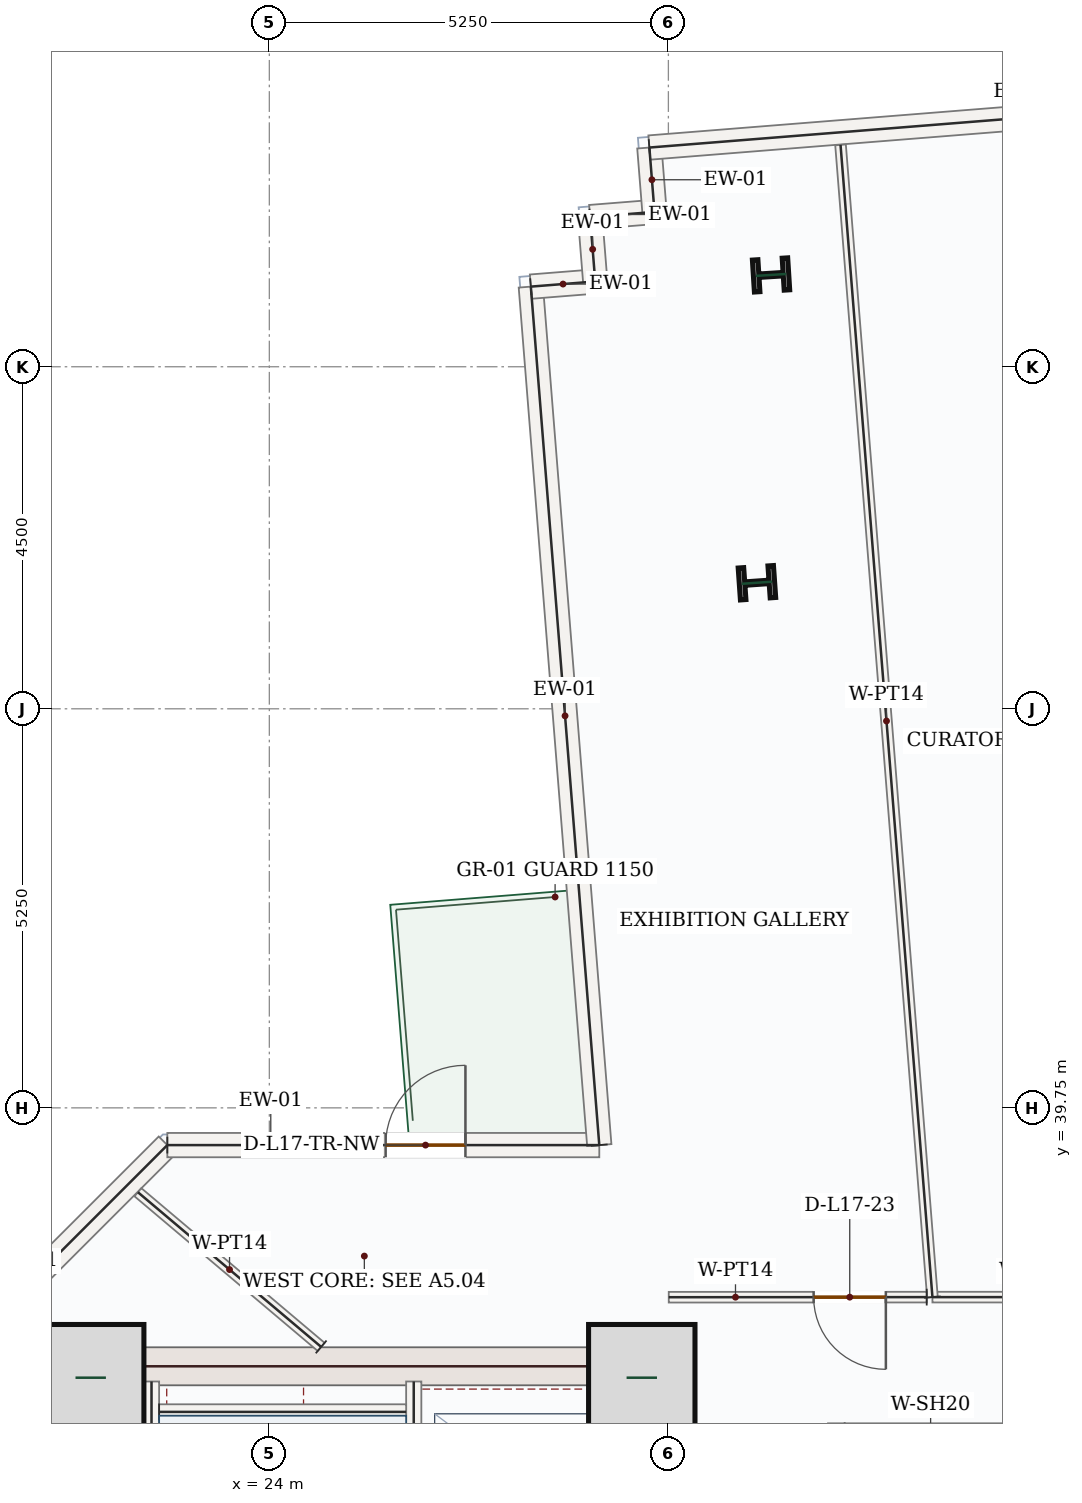
"""IFC4 building model, lengths in metres.
Left out: names, types, materials, properties, quantities, classifications, styles, units other than length and angle.
Written with IfcOpenShell. Run it as: python <this file> out.ifc"""

import sys

from ifc_helpers import new_model, si_unit, direction, frame, frame_2d, origin, origin_2d, place, context, subcontext, project, spatial, rectangle, i_section, extrude, source, transform, mapped, element, fill, save


model = new_model("IFC4")
c1 = context("Model", 3, precision=1e-05, world=origin(), true_north=direction((0.0, 1.0)))
c2 = subcontext(c1, "Body", "Model", "MODEL_VIEW")
j1 = project(units=[si_unit("LENGTHUNIT", "METRE"), si_unit("PLANEANGLEUNIT", "RADIAN")], contexts=[c1])
p1 = place(None, origin())
s1 = spatial("IfcSite", under=j1, at=p1, CompositionType="ELEMENT")
p2 = place(p1, origin())
s2 = spatial("IfcBuilding", under=s1, at=p2, CompositionType="ELEMENT")
p3 = place(p2, frame((0.0, 0.0, 79.5)))
s3 = spatial("IfcBuildingStorey", under=s2, at=p3, CompositionType="ELEMENT", Elevation=79.5)
m1 = source(origin(), c2, "Body", "SweptSolid", [
    extrude(rectangle(XDim=8.55, YDim=0.5, at=frame_2d((4.275, 0.0))), origin(), (0.0, 0.0, 1.0), 3.95),
])
p4 = place(p3, frame((21.5, 28.05, 0.0), z_axis=(0.0, 0.0, 1.0), x_axis=(0.0, 1.0, 0.0)))
e1 = element("IfcWall", 1, at=p4, inside=s3, PredefinedType="SHEAR", context=c2, shape_type="MappedRepresentation", body=[
    mapped(m1, transform((0.0, 0.0, 0.0), x_axis=(1.0, 0.0, 0.0), y_axis=(0.0, 1.0, 0.0), z_axis=(0.0, 0.0, 1.0), scale=1.0)),
])
p5 = place(p3, frame((29.0, 28.05, 0.0), z_axis=(0.0, 0.0, 1.0), x_axis=(0.0, 1.0, 0.0)))
e2 = element("IfcWall", 2, at=p5, inside=s3, PredefinedType="SHEAR", context=c2, shape_type="SweptSolid", body=[
    extrude(rectangle(XDim=8.55, YDim=0.5, at=frame_2d((4.275, 0.0))), origin(), (0.0, 0.0, 1.0), 3.95),
])
p6 = place(p5, frame((1.5, 0.0, 0.0)))
e3 = element("IfcOpeningElement", 3, at=p6, cuts=e2, PredefinedType="OPENING", context=c2, shape_type="SweptSolid", body=[
    extrude(rectangle(XDim=1.1, YDim=2.2, at=frame_2d((0.55, 1.1))), frame((0.0, 0.26, 0.0), z_axis=(0.0, -1.0, 0.0), x_axis=(1.0, 0.0, 0.0)), (0.0, 0.0, 1.0), 0.52),
])
m2 = source(origin(), c2, "Body", "SweptSolid", [
    extrude(rectangle(XDim=7.0, YDim=0.5, at=frame_2d((3.5, 0.0))), origin(), (0.0, 0.0, 1.0), 3.95),
])
p7 = place(p3, frame((21.75, 36.35, 0.0), z_axis=(0.0, 0.0, 1.0), x_axis=(1.0, 0.0, 0.0)))
e4 = element("IfcWall", 4, at=p7, inside=s3, PredefinedType="SHEAR", context=c2, shape_type="MappedRepresentation", body=[
    mapped(m2, transform((0.0, 0.0, 0.0), x_axis=(1.0, 0.0, 0.0), y_axis=(0.0, 1.0, 0.0), z_axis=(0.0, 0.0, 1.0), scale=1.0)),
])
m3 = source(origin(), c2, "Body", "SweptSolid", [
    extrude(rectangle(XDim=1.4, YDim=1.4, at=origin_2d()), origin(), (0.0, 0.0, 1.0), 4.2),
])
for number, where, z_axis, x_axis in (
    (5, (21.65, 36.2, 0.0), (0.0, 0.0, 1.0), (1.0, 0.0, 0.0)),
    (6, (28.9, 36.2, 0.0), (0.0, 0.0, 1.0), (1.0, 0.0, 0.0)),
):
    element("IfcColumn", number, at=place(p3, frame(where, z_axis=z_axis, x_axis=x_axis)), inside=s3, PredefinedType="COLUMN", context=c2, shape_type="MappedRepresentation", body=[
        mapped(m3, transform((0.0, 0.0, 0.0), x_axis=(1.0, 0.0, 0.0), y_axis=(0.0, 1.0, 0.0), z_axis=(0.0, 0.0, 1.0), scale=1.0)),
    ])
m4 = source(origin(), c2, "Body", "SweptSolid", [
    extrude(i_section(OverallWidth=0.421, OverallDepth=0.465, WebThickness=0.045, FlangeThickness=0.073, FilletRadius=0.018, at=origin_2d()), origin(), (0.0, 0.0, 1.0), 4.2),
])
for number, where, z_axis, x_axis in (
    (7, (30.415, 46.658, 0.0), (0.0, 0.0, 1.0), (-0.07, 0.998, 0.0)),
    (8, (30.601, 50.708, 0.0), (0.0, 0.0, 1.0), (-0.063, 0.998, 0.0)),
):
    element("IfcColumn", number, at=place(p3, frame(where, z_axis=z_axis, x_axis=x_axis)), inside=s3, PredefinedType="COLUMN", context=c2, shape_type="MappedRepresentation", body=[
        mapped(m4, transform((0.0, 0.0, 0.0), x_axis=(1.0, 0.0, 0.0), y_axis=(0.0, 1.0, 0.0), z_axis=(0.0, 0.0, 1.0), scale=1.0)),
    ])
m5 = source(origin(), c2, "Body", "SweptSolid", [
    extrude(rectangle(XDim=5.258, YDim=0.32, at=frame_2d((2.629, 0.0))), origin(), (0.0, 0.0, 1.0), 3.95),
])
p8 = place(p3, frame((18.94, 35.542, 0.0), z_axis=(0.0, 0.0, 1.0), x_axis=(0.707106781187, 0.707106781187, 0.0)))
e9 = element("IfcWall", 9, at=p8, inside=s3, PredefinedType="SOLIDWALL", context=c2, shape_type="MappedRepresentation", body=[
    mapped(m5, transform((0.0, 0.0, 0.0), x_axis=(1.0, 0.0, 0.0), y_axis=(0.0, 1.0, 0.0), z_axis=(0.0, 0.0, 1.0), scale=1.0)),
])
p9 = place(p3, frame((22.658, 39.26, 0.0), z_axis=(0.0, 0.0, 1.0), x_axis=(1.0, 0.0, 0.0)))
e10 = element("IfcWall", 10, at=p9, inside=s3, PredefinedType="SOLIDWALL", context=c2, shape_type="SweptSolid", body=[
    extrude(rectangle(XDim=5.683, YDim=0.32, at=frame_2d((2.842, 0.0))), origin(), (0.0, 0.0, 1.0), 3.95),
])
p10 = place(p9, frame((2.872, 0.0, 0.0)))
e11 = element("IfcOpeningElement", 11, at=p10, cuts=e10, PredefinedType="OPENING", context=c2, shape_type="SweptSolid", body=[
    extrude(rectangle(XDim=1.05, YDim=2.15, at=frame_2d((0.525, 1.075))), frame((0.0, 0.17, 0.0), z_axis=(0.0, -1.0, 0.0), x_axis=(1.0, 0.0, 0.0)), (0.0, 0.0, 1.0), 0.34),
])
m6 = source(origin(), c2, "Body", "SweptSolid", [
    extrude(rectangle(XDim=11.33, YDim=0.32, at=frame_2d((5.665, 0.0))), origin(), (0.0, 0.0, 1.0), 3.95),
])
p11 = place(p3, frame((28.341, 39.26, 0.0), z_axis=(0.0, 0.0, 1.0), x_axis=(-0.079512268319, 0.996833887459, 0.0)))
e12 = element("IfcWall", 12, at=p11, inside=s3, PredefinedType="SOLIDWALL", context=c2, shape_type="MappedRepresentation", body=[
    mapped(m6, transform((0.0, 0.0, 0.0), x_axis=(1.0, 0.0, 0.0), y_axis=(0.0, 1.0, 0.0), z_axis=(0.0, 0.0, 1.0), scale=1.0)),
])
m7 = source(origin(), c2, "Body", "SweptSolid", [
    extrude(rectangle(XDim=0.85, YDim=0.32, at=frame_2d((0.425, 0.0))), origin(), (0.0, 0.0, 1.0), 3.95),
])
for number, where, z_axis, x_axis in (
    (13, (27.44, 50.554, 0.0), (0.0, 0.0, 1.0), (0.997, 0.079, 0.0)),
    (14, (28.288, 50.622, 0.0), (0.0, 0.0, 1.0), (-0.08, 0.997, 0.0)),
    (15, (28.22, 51.469, 0.0), (0.0, 0.0, 1.0), (0.997, 0.08, 0.0)),
):
    element("IfcWall", number, at=place(p3, frame(where, z_axis=z_axis, x_axis=x_axis)), inside=s3, PredefinedType="SOLIDWALL", context=c2, shape_type="MappedRepresentation", body=[
        mapped(m7, transform((0.0, 0.0, 0.0), x_axis=(1.0, 0.0, 0.0), y_axis=(0.0, 1.0, 0.0), z_axis=(0.0, 0.0, 1.0), scale=1.0)),
    ])
m8 = source(origin(), c2, "Body", "SweptSolid", [
    extrude(rectangle(XDim=0.85, YDim=0.32, at=frame_2d((0.425, 0.0))), origin(), (0.0, 0.0, 1.0), 3.95),
])
p12 = place(p3, frame((29.067, 51.537, 0.0), z_axis=(0.0, 0.0, 1.0), x_axis=(-0.079573954853, 0.996828965123, 0.0)))
e16 = element("IfcWall", 16, at=p12, inside=s3, PredefinedType="SOLIDWALL", context=c2, shape_type="MappedRepresentation", body=[
    mapped(m8, transform((0.0, 0.0, 0.0), x_axis=(1.0, 0.0, 0.0), y_axis=(0.0, 1.0, 0.0), z_axis=(0.0, 0.0, 1.0), scale=1.0)),
])
m9 = source(origin(), c2, "Body", "SweptSolid", [
    extrude(rectangle(XDim=9.92, YDim=0.32, at=frame_2d((4.96, 0.0))), origin(), (0.0, 0.0, 1.0), 3.95),
])
p13 = place(p3, frame((29.0, 52.384, 0.0), z_axis=(0.0, 0.0, 1.0), x_axis=(0.996833485558, 0.079517306731, 0.0)))
e17 = element("IfcWall", 17, at=p13, inside=s3, PredefinedType="SOLIDWALL", context=c2, shape_type="MappedRepresentation", body=[
    mapped(m9, transform((0.0, 0.0, 0.0), x_axis=(1.0, 0.0, 0.0), y_axis=(0.0, 1.0, 0.0), z_axis=(0.0, 0.0, 1.0), scale=1.0)),
])
m10 = source(origin(), c2, "Body", "SweptSolid", [
    extrude(rectangle(XDim=7.87, YDim=0.2, at=frame_2d((3.935, 0.0))), origin(), (0.0, 0.0, 1.0), 3.95),
])
p14 = place(p3, frame((22.45, 28.28, 0.0), z_axis=(0.0, 0.0, 1.0), x_axis=(0.0, 1.0, 0.0)))
e18 = element("IfcWall", 18, at=p14, inside=s3, PredefinedType="SOLIDWALL", context=c2, shape_type="MappedRepresentation", body=[
    mapped(m10, transform((0.0, 0.0, 0.0), x_axis=(1.0, 0.0, 0.0), y_axis=(0.0, 1.0, 0.0), z_axis=(0.0, 0.0, 1.0), scale=1.0)),
])
p15 = place(p3, frame((25.9, 28.15, 0.0), z_axis=(0.0, 0.0, 1.0), x_axis=(0.0, 1.0, 0.0)))
e19 = element("IfcWall", 19, at=p15, inside=s3, PredefinedType="SOLIDWALL", context=c2, shape_type="SweptSolid", body=[
    extrude(rectangle(XDim=8.0, YDim=0.2, at=frame_2d((4.0, 0.0))), origin(), (0.0, 0.0, 1.0), 3.95),
])
p16 = place(p15, frame((0.4, 0.0, 0.0)))
e20 = element("IfcOpeningElement", 20, at=p16, cuts=e19, PredefinedType="OPENING", context=c2, shape_type="SweptSolid", body=[
    extrude(rectangle(XDim=1.05, YDim=2.15, at=frame_2d((0.525, 1.075))), frame((0.0, 0.11, 0.0), z_axis=(0.0, -1.0, 0.0), x_axis=(1.0, 0.0, 0.0)), (0.0, 0.0, 1.0), 0.22),
])
m11 = source(origin(), c2, "Body", "SweptSolid", [
    extrude(rectangle(XDim=3.25, YDim=0.2, at=frame_2d((1.625, 0.0))), origin(), (0.0, 0.0, 1.0), 3.95),
])
p17 = place(p3, frame((22.55, 35.75, 0.0), z_axis=(0.0, 0.0, 1.0), x_axis=(1.0, 0.0, 0.0)))
e21 = element("IfcWall", 21, at=p17, inside=s3, PredefinedType="SOLIDWALL", context=c2, shape_type="MappedRepresentation", body=[
    mapped(m11, transform((0.0, 0.0, 0.0), x_axis=(1.0, 0.0, 0.0), y_axis=(0.0, 1.0, 0.0), z_axis=(0.0, 0.0, 1.0), scale=1.0)),
])
m12 = source(origin(), c2, "Body", "SweptSolid", [
    extrude(rectangle(XDim=2.4, YDim=0.2, at=frame_2d((1.2, 0.0))), origin(), (0.0, 0.0, 1.0), 3.95),
])
p18 = place(p3, frame((31.45, 33.2, 0.0), z_axis=(0.0, 0.0, 1.0), x_axis=(0.0, 1.0, 0.0)))
e22 = element("IfcWall", 22, at=p18, inside=s3, PredefinedType="SOLIDWALL", context=c2, shape_type="MappedRepresentation", body=[
    mapped(m12, transform((0.0, 0.0, 0.0), x_axis=(1.0, 0.0, 0.0), y_axis=(0.0, 1.0, 0.0), z_axis=(0.0, 0.0, 1.0), scale=1.0)),
])
p19 = place(p3, frame((37.384, 37.26, 0.0), z_axis=(0.0, 0.0, 1.0), x_axis=(-1.0, 0.0, 0.0)))
e23 = element("IfcWall", 23, at=p19, inside=s3, PredefinedType="PARTITIONING", context=c2, shape_type="SweptSolid", body=[
    extrude(rectangle(XDim=4.66, YDim=0.14, at=frame_2d((2.33, 0.0))), origin(), (0.0, 0.0, 1.0), 3.95),
])
p20 = place(p19, frame((0.816, 0.0, 0.0)))
e24 = element("IfcOpeningElement", 24, at=p20, cuts=e23, PredefinedType="OPENING", context=c2, shape_type="SweptSolid", body=[
    extrude(rectangle(XDim=0.95, YDim=2.15, at=frame_2d((0.475, 1.075))), frame((0.0, 0.08, 0.0), z_axis=(0.0, -1.0, 0.0), x_axis=(1.0, 0.0, 0.0)), (0.0, 0.0, 1.0), 0.16),
])
m13 = source(origin(), c2, "Body", "SweptSolid", [
    extrude(rectangle(XDim=15.207, YDim=0.14, at=frame_2d((7.604, 0.0))), origin(), (0.0, 0.0, 1.0), 3.95),
])
p21 = place(p3, frame((32.724, 37.26, 0.0), z_axis=(0.0, 0.0, 1.0), x_axis=(-0.07950146843, 0.996834748851, 0.0)))
e25 = element("IfcWall", 25, at=p21, inside=s3, PredefinedType="PARTITIONING", context=c2, shape_type="MappedRepresentation", body=[
    mapped(m13, transform((0.0, 0.0, 0.0), x_axis=(1.0, 0.0, 0.0), y_axis=(0.0, 1.0, 0.0), z_axis=(0.0, 0.0, 1.0), scale=1.0)),
])
p22 = place(p3, frame((32.649, 37.26, 0.0), z_axis=(0.0, 0.0, 1.0), x_axis=(-0.999999935313, -0.00035968633, 0.0)))
e26 = element("IfcWall", 26, at=p22, inside=s3, PredefinedType="PARTITIONING", context=c2, shape_type="SweptSolid", body=[
    extrude(rectangle(XDim=3.394, YDim=0.14, at=frame_2d((1.697, 0.0))), origin(), (0.0, 0.0, 1.0), 3.95),
])
p23 = place(p22, frame((0.538, 0.0, 0.0)))
e27 = element("IfcOpeningElement", 27, at=p23, cuts=e26, PredefinedType="OPENING", context=c2, shape_type="SweptSolid", body=[
    extrude(rectangle(XDim=0.95, YDim=2.15, at=frame_2d((0.475, 1.075))), frame((0.0, 0.08, 0.0), z_axis=(0.0, -1.0, 0.0), x_axis=(1.0, 0.0, 0.0)), (0.0, 0.0, 1.0), 0.16),
])
m14 = source(origin(), c2, "Body", "SweptSolid", [
    extrude(rectangle(XDim=3.155, YDim=0.14, at=frame_2d((1.577, 0.0))), origin(), (0.0, 0.0, 1.0), 3.95),
])
p24 = place(p3, frame((24.682, 36.605, 0.0), z_axis=(0.0, 0.0, 1.0), x_axis=(-0.76411384058, 0.645081420159, 0.0)))
e28 = element("IfcWall", 28, at=p24, inside=s3, PredefinedType="PARTITIONING", context=c2, shape_type="MappedRepresentation", body=[
    mapped(m14, transform((0.0, 0.0, 0.0), x_axis=(1.0, 0.0, 0.0), y_axis=(0.0, 1.0, 0.0), z_axis=(0.0, 0.0, 1.0), scale=1.0)),
])
m15 = source(origin(), c2, "Body", "SweptSolid", [
    extrude(rectangle(XDim=1.05, YDim=2.15, at=frame_2d((0.525, 1.075))), frame((0.0, 0.025, 0.0), z_axis=(0.0, -1.0, 0.0), x_axis=(1.0, 0.0, 0.0)), (0.0, 0.0, 1.0), 0.05),
])
p25 = place(p10, origin())
e29 = element("IfcDoor", 29, at=p25, inside=s3, OperationType="SINGLE_SWING_RIGHT", PredefinedType="DOOR", context=c2, shape_type="MappedRepresentation", body=[
    mapped(m15, transform((0.0, 0.0, 0.0), x_axis=(1.0, 0.0, 0.0), y_axis=(0.0, 1.0, 0.0), z_axis=(0.0, 0.0, 1.0), scale=1.0)),
])
fill(e11, e29)
m16 = source(origin(), c2, "Body", "SweptSolid", [
    extrude(rectangle(XDim=0.95, YDim=2.15, at=frame_2d((0.475, 1.075))), frame((0.0, 0.025, 0.0), z_axis=(0.0, -1.0, 0.0), x_axis=(1.0, 0.0, 0.0)), (0.0, 0.0, 1.0), 0.05),
])
p26 = place(p23, origin())
e30 = element("IfcDoor", 30, at=p26, inside=s3, OperationType="SINGLE_SWING_LEFT", PredefinedType="DOOR", context=c2, shape_type="MappedRepresentation", body=[
    mapped(m16, transform((0.0, 0.0, 0.0), x_axis=(1.0, 0.0, 0.0), y_axis=(0.0, 1.0, 0.0), z_axis=(0.0, 0.0, 1.0), scale=1.0)),
])
fill(e27, e30)
save(model, sys.argv[1])
